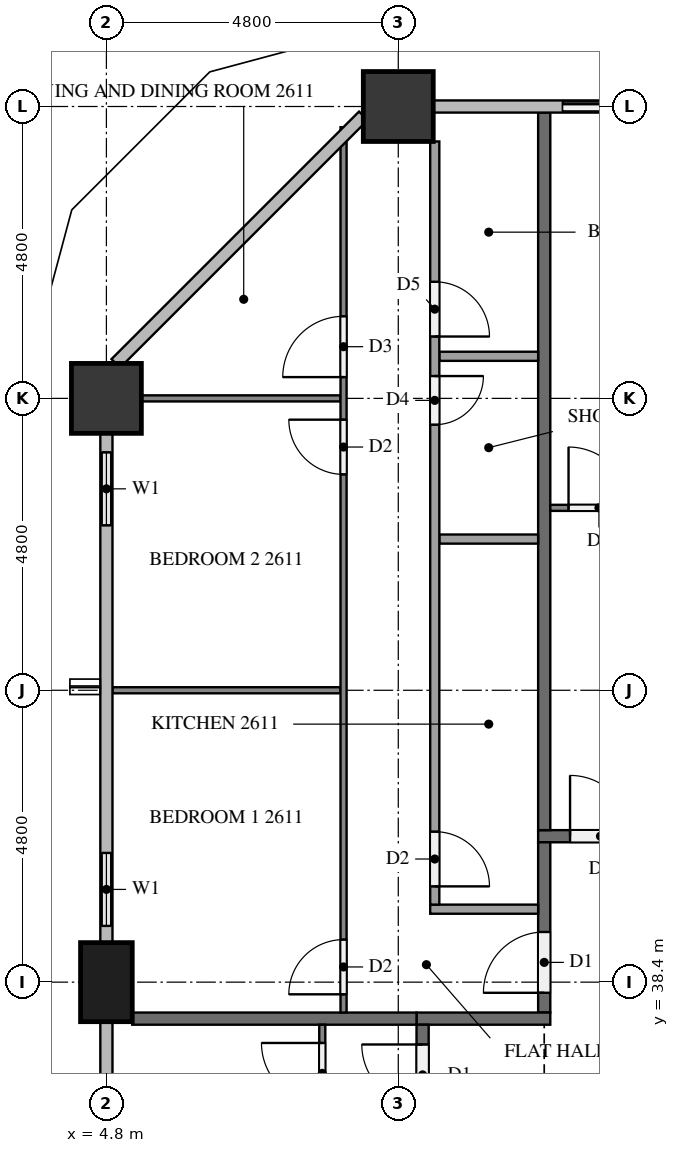
"""IFC4 building model, lengths in metres.
Left out: names, types, materials, properties, quantities, classifications, styles, units other than length and angle.
Written with IfcOpenShell. Run it as: python <this file> out.ifc"""

import sys

from ifc_helpers import new_model, si_unit, direction, frame, frame_2d, origin, origin_2d, place, context, subcontext, project, spatial, rectangle, extrude, element, fill, save


model = new_model("IFC4")
c1 = context("Model", 3, precision=1e-05, world=origin(), true_north=direction((0.0, 1.0)))
c2 = subcontext(c1, "Body", "Model", "MODEL_VIEW")
j1 = project(units=[si_unit("LENGTHUNIT", "METRE"), si_unit("PLANEANGLEUNIT", "RADIAN")], contexts=[c1])
p1 = place(None, origin())
s1 = spatial("IfcSite", under=j1, at=p1, CompositionType="ELEMENT")
p2 = place(p1, origin())
s2 = spatial("IfcBuilding", under=s1, at=p2, CompositionType="ELEMENT")
p3 = place(p2, frame((0.0, 0.0, 103.2)))
s3 = spatial("IfcBuildingStorey", under=s2, at=p3, CompositionType="ELEMENT", Elevation=103.2)
for number, where, z_axis, x_axis in (
    (1, (9.6, 52.8, 0.0), (0.0, 0.0, 1.0), (1.0, 0.0, 0.0)),
    (2, (4.8, 48.0, 0.0), (0.0, 0.0, 1.0), (1.0, 0.0, 0.0)),
):
    element("IfcColumn", number, at=place(p3, frame(where, z_axis=z_axis, x_axis=x_axis)), inside=s3, PredefinedType="COLUMN", context=c2, shape_type="SweptSolid", body=[
        extrude(rectangle(XDim=1.15, YDim=1.15, at=origin_2d()), origin(), (0.0, 0.0, 1.0), 3.2),
    ])
p4 = place(p3, frame((4.8, 38.4, 0.0), z_axis=(0.0, 0.0, 1.0), x_axis=(0.0, 1.0, 0.0)))
e3 = element("IfcColumn", 3, at=p4, inside=s3, PredefinedType="COLUMN", context=c2, shape_type="SweptSolid", body=[
    extrude(rectangle(XDim=1.3, YDim=0.85, at=origin_2d()), origin(), (0.0, 0.0, 1.0), 3.2),
])
p5 = place(p3, frame((14.4, 52.8, 0.0), z_axis=(0.0, 0.0, 1.0), x_axis=(-1.0, 0.0, 0.0)))
e4 = element("IfcWall", 4, at=p5, inside=s3, PredefinedType="SOLIDWALL", context=c2, shape_type="SweptSolid", body=[
    extrude(rectangle(XDim=2.4, YDim=0.15, at=frame_2d((1.2, 0.0))), origin(), (0.0, 0.0, 1.0), 3.2),
])
p6 = place(p5, frame((0.3, 0.0, 0.0)))
e5 = element("IfcOpeningElement", 5, at=p6, cuts=e4, PredefinedType="OPENING", context=c2, shape_type="SweptSolid", body=[
    extrude(rectangle(XDim=1.8, YDim=2.4, at=frame_2d((0.9, 1.2))), frame((0.0, 0.085, 0.0), z_axis=(0.0, -1.0, 0.0), x_axis=(1.0, 0.0, 0.0)), (0.0, 0.0, 1.0), 0.17),
])
p7 = place(p3, frame((4.8, 47.425, 0.0), z_axis=(0.0, 0.0, 1.0), x_axis=(0.0, -1.0, 0.0)))
e6 = element("IfcWall", 6, at=p7, inside=s3, PredefinedType="SOLIDWALL", context=c2, shape_type="SweptSolid", body=[
    extrude(rectangle(XDim=1.825, YDim=0.15, at=frame_2d((0.913, 0.0))), origin(), (0.0, 0.0, 1.0), 3.2),
])
p8 = place(p7, frame((0.312, 0.0, 0.9)))
e7 = element("IfcOpeningElement", 7, at=p8, cuts=e6, PredefinedType="OPENING", context=c2, shape_type="SweptSolid", body=[
    extrude(rectangle(XDim=1.2, YDim=1.4, at=frame_2d((0.6, 0.7))), frame((0.0, 0.085, 0.0), z_axis=(0.0, -1.0, 0.0), x_axis=(1.0, 0.0, 0.0)), (0.0, 0.0, 1.0), 0.17),
])
p9 = place(p3, frame((4.8, 40.8, 0.0), z_axis=(0.0, 0.0, 1.0), x_axis=(0.0, -1.0, 0.0)))
e8 = element("IfcWall", 8, at=p9, inside=s3, PredefinedType="SOLIDWALL", context=c2, shape_type="SweptSolid", body=[
    extrude(rectangle(XDim=1.75, YDim=0.15, at=frame_2d((0.875, 0.0))), origin(), (0.0, 0.0, 1.0), 3.2),
])
p10 = place(p9, frame((0.275, 0.0, 0.9)))
e9 = element("IfcOpeningElement", 9, at=p10, cuts=e8, PredefinedType="OPENING", context=c2, shape_type="SweptSolid", body=[
    extrude(rectangle(XDim=1.2, YDim=1.4, at=frame_2d((0.6, 0.7))), frame((0.0, 0.085, 0.0), z_axis=(0.0, -1.0, 0.0), x_axis=(1.0, 0.0, 0.0)), (0.0, 0.0, 1.0), 0.17),
])
p11 = place(p3, frame((11.9, 40.8, 0.0), z_axis=(0.0, 0.0, 1.0), x_axis=(1.0, 0.0, 0.0)))
e10 = element("IfcWall", 10, at=p11, inside=s3, PredefinedType="PARTITIONING", context=c2, shape_type="SweptSolid", body=[
    extrude(rectangle(XDim=38.6, YDim=0.2, at=frame_2d((19.3, 0.0))), origin(), (0.0, 0.0, 1.0), 3.2),
])
p12 = place(p11, frame((22.125, 0.0, 0.0)))
e11 = element("IfcOpeningElement", 11, at=p12, cuts=e10, PredefinedType="OPENING", context=c2, shape_type="SweptSolid", body=[
    extrude(rectangle(XDim=1.0, YDim=2.1, at=frame_2d((0.5, 1.05))), frame((0.0, 0.11, 0.0), z_axis=(0.0, -1.0, 0.0), x_axis=(1.0, 0.0, 0.0)), (0.0, 0.0, 1.0), 0.22),
])
p13 = place(p11, frame((20.275, 0.0, 0.0)))
e12 = element("IfcOpeningElement", 12, at=p13, cuts=e10, PredefinedType="OPENING", context=c2, shape_type="SweptSolid", body=[
    extrude(rectangle(XDim=1.0, YDim=2.1, at=frame_2d((0.5, 1.05))), frame((0.0, 0.11, 0.0), z_axis=(0.0, -1.0, 0.0), x_axis=(1.0, 0.0, 0.0)), (0.0, 0.0, 1.0), 0.22),
])
p14 = place(p11, frame((0.525, 0.0, 0.0)))
e13 = element("IfcOpeningElement", 13, at=p14, cuts=e10, PredefinedType="OPENING", context=c2, shape_type="SweptSolid", body=[
    extrude(rectangle(XDim=1.0, YDim=2.1, at=frame_2d((0.5, 1.05))), frame((0.0, 0.11, 0.0), z_axis=(0.0, -1.0, 0.0), x_axis=(1.0, 0.0, 0.0)), (0.0, 0.0, 1.0), 0.22),
])
p15 = place(p3, frame((12.0, 37.9, 0.0), z_axis=(0.0, 0.0, 1.0), x_axis=(0.0, 1.0, 0.0)))
e14 = element("IfcWall", 14, at=p15, inside=s3, PredefinedType="PARTITIONING", context=c2, shape_type="SweptSolid", body=[
    extrude(rectangle(XDim=2.8, YDim=0.2, at=frame_2d((1.4, 0.0))), origin(), (0.0, 0.0, 1.0), 3.2),
])
p16 = place(p15, frame((0.325, 0.0, 0.0)))
e15 = element("IfcOpeningElement", 15, at=p16, cuts=e14, PredefinedType="OPENING", context=c2, shape_type="SweptSolid", body=[
    extrude(rectangle(XDim=1.0, YDim=2.1, at=frame_2d((0.5, 1.05))), frame((0.0, 0.11, 0.0), z_axis=(0.0, -1.0, 0.0), x_axis=(1.0, 0.0, 0.0)), (0.0, 0.0, 1.0), 0.22),
])
p17 = place(p3, frame((12.1, 37.8, 0.0), z_axis=(0.0, 0.0, 1.0), x_axis=(-1.0, 0.0, 0.0)))
e16 = element("IfcWall", 16, at=p17, inside=s3, PredefinedType="PARTITIONING", context=c2, shape_type="SweptSolid", body=[
    extrude(rectangle(XDim=2.2, YDim=0.2, at=frame_2d((1.1, 0.0))), origin(), (0.0, 0.0, 1.0), 3.2),
])
p18 = place(p3, frame((10.0, 15.1, 0.0), z_axis=(0.0, 0.0, 1.0), x_axis=(0.0, 1.0, 0.0)))
e17 = element("IfcWall", 17, at=p18, inside=s3, PredefinedType="PARTITIONING", context=c2, shape_type="SweptSolid", body=[
    extrude(rectangle(XDim=22.6, YDim=0.2, at=frame_2d((11.3, 0.0))), origin(), (0.0, 0.0, 1.0), 3.2),
])
p19 = place(p18, frame((21.275, 0.0, 0.0)))
e18 = element("IfcOpeningElement", 18, at=p19, cuts=e17, PredefinedType="OPENING", context=c2, shape_type="SweptSolid", body=[
    extrude(rectangle(XDim=1.0, YDim=2.1, at=frame_2d((0.5, 1.05))), frame((0.0, 0.11, 0.0), z_axis=(0.0, -1.0, 0.0), x_axis=(1.0, 0.0, 0.0)), (0.0, 0.0, 1.0), 0.22),
])
p20 = place(p18, frame((7.475, 0.0, 0.0)))
e19 = element("IfcOpeningElement", 19, at=p20, cuts=e17, PredefinedType="OPENING", context=c2, shape_type="SweptSolid", body=[
    extrude(rectangle(XDim=1.0, YDim=2.1, at=frame_2d((0.5, 1.05))), frame((0.0, 0.11, 0.0), z_axis=(0.0, -1.0, 0.0), x_axis=(1.0, 0.0, 0.0)), (0.0, 0.0, 1.0), 0.22),
])
p21 = place(p3, frame((12.0, 52.7, 0.0), z_axis=(0.0, 0.0, 1.0), x_axis=(0.0, -1.0, 0.0)))
e20 = element("IfcWall", 20, at=p21, inside=s3, PredefinedType="PARTITIONING", context=c2, shape_type="SweptSolid", body=[
    extrude(rectangle(XDim=11.8, YDim=0.2, at=frame_2d((5.9, 0.0))), origin(), (0.0, 0.0, 1.0), 3.2),
])
p22 = place(p3, frame((5.225, 37.8, 0.0), z_axis=(0.0, 0.0, 1.0), x_axis=(1.0, 0.0, 0.0)))
e21 = element("IfcWall", 21, at=p22, inside=s3, PredefinedType="PARTITIONING", context=c2, shape_type="SweptSolid", body=[
    extrude(rectangle(XDim=4.675, YDim=0.2, at=frame_2d((2.337, 0.0))), origin(), (0.0, 0.0, 1.0), 3.2),
])
p23 = place(p3, frame((12.1, 46.2, 0.0), z_axis=(0.0, 0.0, 1.0), x_axis=(1.0, 0.0, 0.0)))
e22 = element("IfcWall", 22, at=p23, inside=s3, PredefinedType="PARTITIONING", context=c2, shape_type="SweptSolid", body=[
    extrude(rectangle(XDim=9.4, YDim=0.1, at=frame_2d((4.7, 0.0))), origin(), (0.0, 0.0, 1.0), 3.2),
])
p24 = place(p23, frame((0.3, 0.0, 0.0)))
e23 = element("IfcOpeningElement", 23, at=p24, cuts=e22, PredefinedType="OPENING", context=c2, shape_type="SweptSolid", body=[
    extrude(rectangle(XDim=1.0, YDim=2.1, at=frame_2d((0.5, 1.05))), frame((0.0, 0.06, 0.0), z_axis=(0.0, -1.0, 0.0), x_axis=(1.0, 0.0, 0.0)), (0.0, 0.0, 1.0), 0.12),
])
p25 = place(p23, frame((8.2, 0.0, 0.0)))
e24 = element("IfcOpeningElement", 24, at=p25, cuts=e22, PredefinedType="OPENING", context=c2, shape_type="SweptSolid", body=[
    extrude(rectangle(XDim=0.9, YDim=2.1, at=frame_2d((0.45, 1.05))), frame((0.0, 0.06, 0.0), z_axis=(0.0, -1.0, 0.0), x_axis=(1.0, 0.0, 0.0)), (0.0, 0.0, 1.0), 0.12),
])
p26 = place(p3, frame((8.65, 43.2, 0.0), z_axis=(0.0, 0.0, 1.0), x_axis=(-1.0, 0.0, 0.0)))
e25 = element("IfcWall", 25, at=p26, inside=s3, PredefinedType="PARTITIONING", context=c2, shape_type="SweptSolid", body=[
    extrude(rectangle(XDim=3.75, YDim=0.1, at=frame_2d((1.875, 0.0))), origin(), (0.0, 0.0, 1.0), 3.2),
])
p27 = place(p3, frame((8.65, 48.0, 0.0), z_axis=(0.0, 0.0, 1.0), x_axis=(-1.0, 0.0, 0.0)))
e26 = element("IfcWall", 26, at=p27, inside=s3, PredefinedType="PARTITIONING", context=c2, shape_type="SweptSolid", body=[
    extrude(rectangle(XDim=3.275, YDim=0.1, at=frame_2d((1.637, 0.0))), origin(), (0.0, 0.0, 1.0), 3.2),
])
p28 = place(p3, frame((8.7, 37.9, 0.0), z_axis=(0.0, 0.0, 1.0), x_axis=(0.0, 1.0, 0.0)))
e27 = element("IfcWall", 27, at=p28, inside=s3, PredefinedType="PARTITIONING", context=c2, shape_type="SweptSolid", body=[
    extrude(rectangle(XDim=14.559, YDim=0.1, at=frame_2d((7.279, 0.0))), origin(), (0.0, 0.0, 1.0), 3.2),
])
p29 = place(p28, frame((0.3, 0.0, 0.0)))
e28 = element("IfcOpeningElement", 28, at=p29, cuts=e27, PredefinedType="OPENING", context=c2, shape_type="SweptSolid", body=[
    extrude(rectangle(XDim=0.9, YDim=2.1, at=frame_2d((0.45, 1.05))), frame((0.0, 0.06, 0.0), z_axis=(0.0, -1.0, 0.0), x_axis=(1.0, 0.0, 0.0)), (0.0, 0.0, 1.0), 0.12),
])
p30 = place(p28, frame((8.85, 0.0, 0.0)))
e29 = element("IfcOpeningElement", 29, at=p30, cuts=e27, PredefinedType="OPENING", context=c2, shape_type="SweptSolid", body=[
    extrude(rectangle(XDim=0.9, YDim=2.1, at=frame_2d((0.45, 1.05))), frame((0.0, 0.06, 0.0), z_axis=(0.0, -1.0, 0.0), x_axis=(1.0, 0.0, 0.0)), (0.0, 0.0, 1.0), 0.12),
])
p31 = place(p28, frame((10.45, 0.0, 0.0)))
e30 = element("IfcOpeningElement", 30, at=p31, cuts=e27, PredefinedType="OPENING", context=c2, shape_type="SweptSolid", body=[
    extrude(rectangle(XDim=1.0, YDim=2.1, at=frame_2d((0.5, 1.05))), frame((0.0, 0.06, 0.0), z_axis=(0.0, -1.0, 0.0), x_axis=(1.0, 0.0, 0.0)), (0.0, 0.0, 1.0), 0.12),
])
for number, where, z_axis, x_axis in (
    (31, (11.9, 45.687, 0.0), (0.0, 0.0, 1.0), (-1.0, 0.0, 0.0)),
    (32, (11.9, 48.692, 0.0), (0.0, 0.0, 1.0), (-1.0, 0.0, 0.0)),
):
    element("IfcWall", number, at=place(p3, frame(where, z_axis=z_axis, x_axis=x_axis)), inside=s3, PredefinedType="PARTITIONING", context=c2, shape_type="SweptSolid", body=[
        extrude(rectangle(XDim=1.625, YDim=0.15, at=frame_2d((0.812, 0.0))), origin(), (0.0, 0.0, 1.0), 3.2),
    ])
p32 = place(p3, frame((11.9, 39.6, 0.0), z_axis=(0.0, 0.0, 1.0), x_axis=(-1.0, 0.0, 0.0)))
e33 = element("IfcWall", 33, at=p32, inside=s3, PredefinedType="PARTITIONING", context=c2, shape_type="SweptSolid", body=[
    extrude(rectangle(XDim=1.775, YDim=0.15, at=frame_2d((0.887, 0.0))), origin(), (0.0, 0.0, 1.0), 3.2),
])
p33 = place(p3, frame((10.2, 52.225, 0.0), z_axis=(0.0, 0.0, 1.0), x_axis=(0.0, -1.0, 0.0)))
e34 = element("IfcWall", 34, at=p33, inside=s3, PredefinedType="PARTITIONING", context=c2, shape_type="SweptSolid", body=[
    extrude(rectangle(XDim=12.55, YDim=0.15, at=frame_2d((6.275, 0.0))), origin(), (0.0, 0.0, 1.0), 3.2),
])
p34 = place(p33, frame((11.35, 0.0, 0.0)))
e35 = element("IfcOpeningElement", 35, at=p34, cuts=e34, PredefinedType="OPENING", context=c2, shape_type="SweptSolid", body=[
    extrude(rectangle(XDim=0.9, YDim=2.1, at=frame_2d((0.45, 1.05))), frame((0.0, 0.085, 0.0), z_axis=(0.0, -1.0, 0.0), x_axis=(1.0, 0.0, 0.0)), (0.0, 0.0, 1.0), 0.17),
])
p35 = place(p33, frame((3.858, 0.0, 0.0)))
e36 = element("IfcOpeningElement", 36, at=p35, cuts=e34, PredefinedType="OPENING", context=c2, shape_type="SweptSolid", body=[
    extrude(rectangle(XDim=0.8, YDim=2.1, at=frame_2d((0.4, 1.05))), frame((0.0, 0.085, 0.0), z_axis=(0.0, -1.0, 0.0), x_axis=(1.0, 0.0, 0.0)), (0.0, 0.0, 1.0), 0.17),
])
p36 = place(p33, frame((2.308, 0.0, 0.0)))
e37 = element("IfcOpeningElement", 37, at=p36, cuts=e34, PredefinedType="OPENING", context=c2, shape_type="SweptSolid", body=[
    extrude(rectangle(XDim=0.9, YDim=2.1, at=frame_2d((0.45, 1.05))), frame((0.0, 0.085, 0.0), z_axis=(0.0, -1.0, 0.0), x_axis=(1.0, 0.0, 0.0)), (0.0, 0.0, 1.0), 0.17),
])
p37 = place(p3, frame((8.35, 24.1, 0.0), z_axis=(0.0, 0.0, 1.0), x_axis=(0.0, 1.0, 0.0)))
e38 = element("IfcWall", 38, at=p37, inside=s3, PredefinedType="PARTITIONING", context=c2, shape_type="SweptSolid", body=[
    extrude(rectangle(XDim=13.6, YDim=0.1, at=frame_2d((6.8, 0.0))), origin(), (0.0, 0.0, 1.0), 3.2),
])
p38 = place(p37, frame((12.3, 0.0, 0.0)))
e39 = element("IfcOpeningElement", 39, at=p38, cuts=e38, PredefinedType="OPENING", context=c2, shape_type="SweptSolid", body=[
    extrude(rectangle(XDim=1.0, YDim=2.1, at=frame_2d((0.5, 1.05))), frame((0.0, 0.06, 0.0), z_axis=(0.0, -1.0, 0.0), x_axis=(1.0, 0.0, 0.0)), (0.0, 0.0, 1.0), 0.12),
])
p39 = place(p37, frame((5.05, 0.0, 0.0)))
e40 = element("IfcOpeningElement", 40, at=p39, cuts=e38, PredefinedType="OPENING", context=c2, shape_type="SweptSolid", body=[
    extrude(rectangle(XDim=0.9, YDim=2.1, at=frame_2d((0.45, 1.05))), frame((0.0, 0.06, 0.0), z_axis=(0.0, -1.0, 0.0), x_axis=(1.0, 0.0, 0.0)), (0.0, 0.0, 1.0), 0.12),
])
p40 = place(p37, frame((3.55, 0.0, 0.0)))
e41 = element("IfcOpeningElement", 41, at=p40, cuts=e38, PredefinedType="OPENING", context=c2, shape_type="SweptSolid", body=[
    extrude(rectangle(XDim=0.8, YDim=2.1, at=frame_2d((0.4, 1.05))), frame((0.0, 0.06, 0.0), z_axis=(0.0, -1.0, 0.0), x_axis=(1.0, 0.0, 0.0)), (0.0, 0.0, 1.0), 0.12),
])
p41 = place(p37, frame((0.3, 0.0, 0.0)))
e42 = element("IfcOpeningElement", 42, at=p41, cuts=e38, PredefinedType="OPENING", context=c2, shape_type="SweptSolid", body=[
    extrude(rectangle(XDim=0.9, YDim=2.1, at=frame_2d((0.45, 1.05))), frame((0.0, 0.06, 0.0), z_axis=(0.0, -1.0, 0.0), x_axis=(1.0, 0.0, 0.0)), (0.0, 0.0, 1.0), 0.12),
])
p42 = place(p6, origin())
e43 = element("IfcDoor", 43, at=p42, inside=s3, OperationType="SLIDING_TO_RIGHT", PredefinedType="DOOR", context=c2, shape_type="SweptSolid", body=[
    extrude(rectangle(XDim=1.8, YDim=2.4, at=frame_2d((0.9, 1.2))), frame((0.0, 0.025, 0.0), z_axis=(0.0, -1.0, 0.0), x_axis=(1.0, 0.0, 0.0)), (0.0, 0.0, 1.0), 0.05),
])
fill(e5, e43)
p43 = place(p8, origin())
e44 = element("IfcWindow", 44, at=p43, inside=s3, PartitioningType="SINGLE_PANEL", PredefinedType="WINDOW", context=c2, shape_type="SweptSolid", body=[
    extrude(rectangle(XDim=1.2, YDim=1.4, at=frame_2d((0.6, 0.7))), frame((0.0, 0.03, 0.0), z_axis=(0.0, -1.0, 0.0), x_axis=(1.0, 0.0, 0.0)), (0.0, 0.0, 1.0), 0.06),
])
fill(e7, e44)
p44 = place(p10, origin())
e45 = element("IfcWindow", 45, at=p44, inside=s3, PartitioningType="SINGLE_PANEL", PredefinedType="WINDOW", context=c2, shape_type="SweptSolid", body=[
    extrude(rectangle(XDim=1.2, YDim=1.4, at=frame_2d((0.6, 0.7))), frame((0.0, 0.03, 0.0), z_axis=(0.0, -1.0, 0.0), x_axis=(1.0, 0.0, 0.0)), (0.0, 0.0, 1.0), 0.06),
])
fill(e9, e45)
p45 = place(p14, origin())
e46 = element("IfcDoor", 46, at=p45, inside=s3, OperationType="SINGLE_SWING_LEFT", PredefinedType="DOOR", context=c2, shape_type="SweptSolid", body=[
    extrude(rectangle(XDim=1.0, YDim=2.1, at=frame_2d((0.5, 1.05))), frame((0.0, 0.025, 0.0), z_axis=(0.0, -1.0, 0.0), x_axis=(1.0, 0.0, 0.0)), (0.0, 0.0, 1.0), 0.05),
])
fill(e13, e46)
p46 = place(p16, origin())
e47 = element("IfcDoor", 47, at=p46, inside=s3, OperationType="SINGLE_SWING_LEFT", PredefinedType="DOOR", context=c2, shape_type="SweptSolid", body=[
    extrude(rectangle(XDim=1.0, YDim=2.1, at=frame_2d((0.5, 1.05))), frame((0.0, 0.025, 0.0), z_axis=(0.0, -1.0, 0.0), x_axis=(1.0, 0.0, 0.0)), (0.0, 0.0, 1.0), 0.05),
])
fill(e15, e47)
p47 = place(p19, origin())
e48 = element("IfcDoor", 48, at=p47, inside=s3, OperationType="SINGLE_SWING_RIGHT", PredefinedType="DOOR", context=c2, shape_type="SweptSolid", body=[
    extrude(rectangle(XDim=1.0, YDim=2.1, at=frame_2d((0.5, 1.05))), frame((0.0, 0.025, 0.0), z_axis=(0.0, -1.0, 0.0), x_axis=(1.0, 0.0, 0.0)), (0.0, 0.0, 1.0), 0.05),
])
fill(e18, e48)
p48 = place(p24, origin())
e49 = element("IfcDoor", 49, at=p48, inside=s3, OperationType="SINGLE_SWING_LEFT", PredefinedType="DOOR", context=c2, shape_type="SweptSolid", body=[
    extrude(rectangle(XDim=1.0, YDim=2.1, at=frame_2d((0.5, 1.05))), frame((0.0, 0.025, 0.0), z_axis=(0.0, -1.0, 0.0), x_axis=(1.0, 0.0, 0.0)), (0.0, 0.0, 1.0), 0.05),
])
fill(e23, e49)
p49 = place(p29, origin())
e50 = element("IfcDoor", 50, at=p49, inside=s3, OperationType="SINGLE_SWING_LEFT", PredefinedType="DOOR", context=c2, shape_type="SweptSolid", body=[
    extrude(rectangle(XDim=0.9, YDim=2.1, at=frame_2d((0.45, 1.05))), frame((0.0, 0.025, 0.0), z_axis=(0.0, -1.0, 0.0), x_axis=(1.0, 0.0, 0.0)), (0.0, 0.0, 1.0), 0.05),
])
fill(e28, e50)
p50 = place(p30, origin())
e51 = element("IfcDoor", 51, at=p50, inside=s3, OperationType="SINGLE_SWING_RIGHT", PredefinedType="DOOR", context=c2, shape_type="SweptSolid", body=[
    extrude(rectangle(XDim=0.9, YDim=2.1, at=frame_2d((0.45, 1.05))), frame((0.0, 0.025, 0.0), z_axis=(0.0, -1.0, 0.0), x_axis=(1.0, 0.0, 0.0)), (0.0, 0.0, 1.0), 0.05),
])
fill(e29, e51)
p51 = place(p31, origin())
e52 = element("IfcDoor", 52, at=p51, inside=s3, OperationType="SINGLE_SWING_LEFT", PredefinedType="DOOR", context=c2, shape_type="SweptSolid", body=[
    extrude(rectangle(XDim=1.0, YDim=2.1, at=frame_2d((0.5, 1.05))), frame((0.0, 0.025, 0.0), z_axis=(0.0, -1.0, 0.0), x_axis=(1.0, 0.0, 0.0)), (0.0, 0.0, 1.0), 0.05),
])
fill(e30, e52)
p52 = place(p34, origin())
e53 = element("IfcDoor", 53, at=p52, inside=s3, OperationType="SINGLE_SWING_RIGHT", PredefinedType="DOOR", context=c2, shape_type="SweptSolid", body=[
    extrude(rectangle(XDim=0.9, YDim=2.1, at=frame_2d((0.45, 1.05))), frame((0.0, 0.025, 0.0), z_axis=(0.0, -1.0, 0.0), x_axis=(1.0, 0.0, 0.0)), (0.0, 0.0, 1.0), 0.05),
])
fill(e35, e53)
p53 = place(p35, origin())
e54 = element("IfcDoor", 54, at=p53, inside=s3, OperationType="SINGLE_SWING_LEFT", PredefinedType="DOOR", context=c2, shape_type="SweptSolid", body=[
    extrude(rectangle(XDim=0.8, YDim=2.1, at=frame_2d((0.4, 1.05))), frame((0.0, 0.025, 0.0), z_axis=(0.0, -1.0, 0.0), x_axis=(1.0, 0.0, 0.0)), (0.0, 0.0, 1.0), 0.05),
])
fill(e36, e54)
p54 = place(p36, origin())
e55 = element("IfcDoor", 55, at=p54, inside=s3, OperationType="SINGLE_SWING_RIGHT", PredefinedType="DOOR", context=c2, shape_type="SweptSolid", body=[
    extrude(rectangle(XDim=0.9, YDim=2.1, at=frame_2d((0.45, 1.05))), frame((0.0, 0.025, 0.0), z_axis=(0.0, -1.0, 0.0), x_axis=(1.0, 0.0, 0.0)), (0.0, 0.0, 1.0), 0.05),
])
fill(e37, e55)
p55 = place(p38, origin())
e56 = element("IfcDoor", 56, at=p55, inside=s3, OperationType="SINGLE_SWING_RIGHT", PredefinedType="DOOR", context=c2, shape_type="SweptSolid", body=[
    extrude(rectangle(XDim=1.0, YDim=2.1, at=frame_2d((0.5, 1.05))), frame((0.0, 0.025, 0.0), z_axis=(0.0, -1.0, 0.0), x_axis=(1.0, 0.0, 0.0)), (0.0, 0.0, 1.0), 0.05),
])
fill(e39, e56)
save(model, sys.argv[1])
